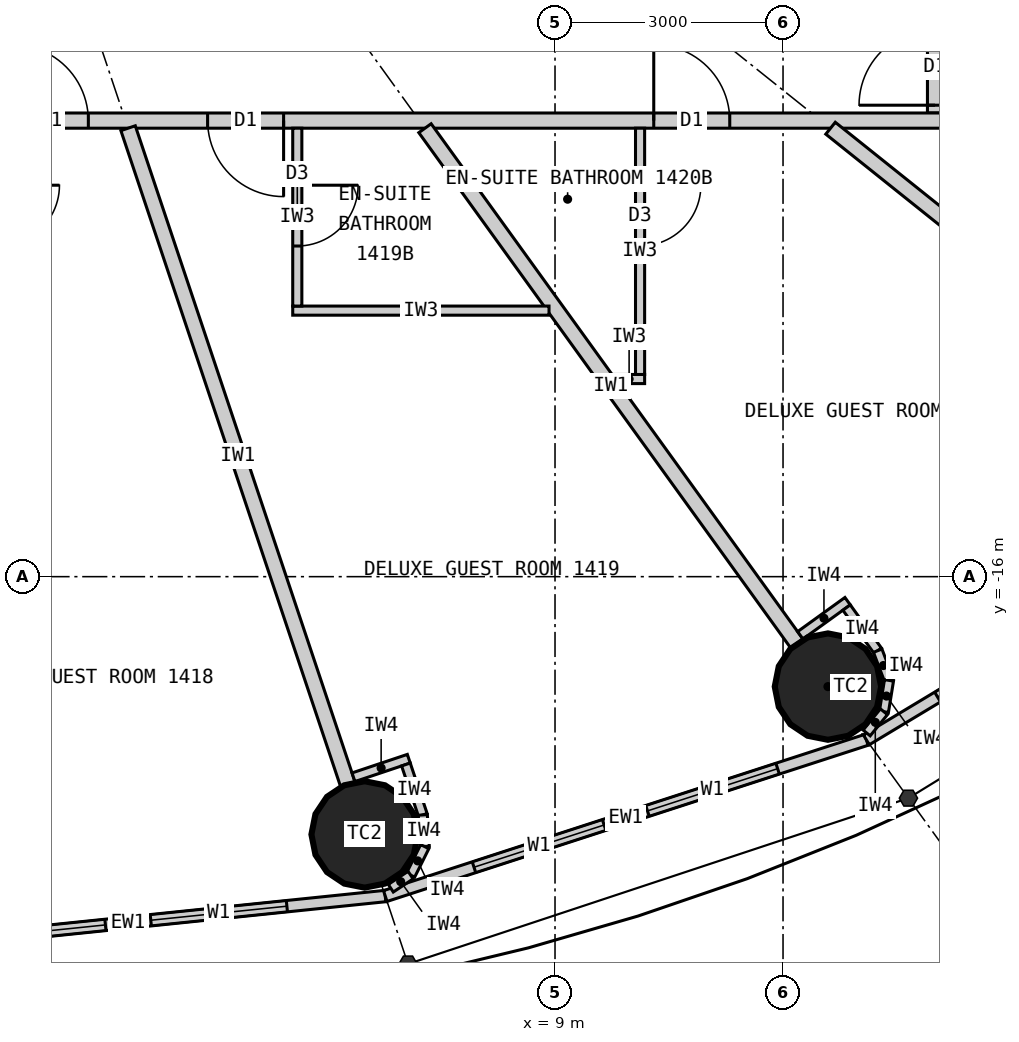
"""IFC4 building model, lengths in metres.
Left out: names, types, materials, properties, quantities, classifications, styles, units other than length and angle.
Written with IfcOpenShell. Run it as: python <this file> out.ifc"""

import sys

from ifc_helpers import new_model, si_unit, direction, frame, frame_2d, origin, origin_2d, place, context, subcontext, project, spatial, rectangle, circle, extrude, element, fill, save


model = new_model("IFC4")
c1 = context("Model", 3, precision=1e-05, world=origin(), true_north=direction((0.0, 1.0)))
c2 = subcontext(c1, "Body", "Model", "MODEL_VIEW")
j1 = project(units=[si_unit("LENGTHUNIT", "METRE"), si_unit("PLANEANGLEUNIT", "RADIAN")], contexts=[c1])
p1 = place(None, origin())
s1 = spatial("IfcSite", under=j1, at=p1, CompositionType="ELEMENT")
p2 = place(p1, origin())
s2 = spatial("IfcBuilding", under=s1, at=p2, CompositionType="ELEMENT")
p3 = place(p2, frame((0.0, 0.0, 60.6)))
s3 = spatial("IfcBuildingStorey", under=s2, at=p3, CompositionType="ELEMENT", Elevation=60.6)
for number, where, z_axis, x_axis in (
    (1, (6.495, -19.391, 0.0), (0.0, 0.0, 1.0), (1.0, 0.0, 0.0)),
    (2, (12.591, -17.447, 0.0), (0.0, 0.0, 1.0), (1.0, 0.0, 0.0)),
):
    element("IfcColumn", number, at=place(p3, frame(where, z_axis=z_axis, x_axis=x_axis)), inside=s3, PredefinedType="COLUMN", context=c2, shape_type="SweptSolid", body=[
        extrude(circle(Radius=0.7, at=origin_2d()), origin(), (0.0, 0.0, 1.0), 3.3),
    ])
p4 = place(p3, frame((0.0, -20.9, 0.0), z_axis=(0.0, 0.0, 1.0), x_axis=(0.994721394369, 0.102612609291, 0.0)))
e3 = element("IfcWall", 3, at=p4, inside=s3, PredefinedType="ELEMENTEDWALL", context=c2, shape_type="SweptSolid", body=[
    extrude(rectangle(XDim=6.802, YDim=0.15, at=frame_2d((3.401, 0.0))), origin(), (0.0, 0.0, 1.0), 3.12),
])
p5 = place(p4, frame((1.301, 0.0, 0.9)))
e4 = element("IfcOpeningElement", 4, at=p5, cuts=e3, PredefinedType="OPENING", context=c2, shape_type="SweptSolid", body=[
    extrude(rectangle(XDim=1.8, YDim=1.9, at=frame_2d((0.9, 0.95))), frame((0.0, 0.085, 0.0), z_axis=(0.0, -1.0, 0.0), x_axis=(1.0, 0.0, 0.0)), (0.0, 0.0, 1.0), 0.17),
])
p6 = place(p4, frame((3.701, 0.0, 0.9)))
e5 = element("IfcOpeningElement", 5, at=p6, cuts=e3, PredefinedType="OPENING", context=c2, shape_type="SweptSolid", body=[
    extrude(rectangle(XDim=1.8, YDim=1.9, at=frame_2d((0.9, 0.95))), frame((0.0, 0.085, 0.0), z_axis=(0.0, -1.0, 0.0), x_axis=(1.0, 0.0, 0.0)), (0.0, 0.0, 1.0), 0.17),
])
p7 = place(p3, frame((6.766, -20.202, 0.0), z_axis=(0.0, 0.0, 1.0), x_axis=(0.951137534625, 0.308767534285, 0.0)))
e6 = element("IfcWall", 6, at=p7, inside=s3, PredefinedType="ELEMENTEDWALL", context=c2, shape_type="SweptSolid", body=[
    extrude(rectangle(XDim=6.655, YDim=0.15, at=frame_2d((3.328, 0.0))), origin(), (0.0, 0.0, 1.0), 3.12),
])
p8 = place(p7, frame((1.228, 0.0, 0.9)))
e7 = element("IfcOpeningElement", 7, at=p8, cuts=e6, PredefinedType="OPENING", context=c2, shape_type="SweptSolid", body=[
    extrude(rectangle(XDim=1.8, YDim=1.9, at=frame_2d((0.9, 0.95))), frame((0.0, 0.085, 0.0), z_axis=(0.0, -1.0, 0.0), x_axis=(1.0, 0.0, 0.0)), (0.0, 0.0, 1.0), 0.17),
])
p9 = place(p7, frame((3.628, 0.0, 0.9)))
e8 = element("IfcOpeningElement", 8, at=p9, cuts=e6, PredefinedType="OPENING", context=c2, shape_type="SweptSolid", body=[
    extrude(rectangle(XDim=1.8, YDim=1.9, at=frame_2d((0.9, 0.95))), frame((0.0, 0.085, 0.0), z_axis=(0.0, -1.0, 0.0), x_axis=(1.0, 0.0, 0.0)), (0.0, 0.0, 1.0), 0.17),
])
p10 = place(p3, frame((13.096, -18.147, 0.0), z_axis=(0.0, 0.0, 1.0), x_axis=(0.856983180864, 0.515344377787, 0.0)))
e9 = element("IfcWall", 9, at=p10, inside=s3, PredefinedType="ELEMENTEDWALL", context=c2, shape_type="SweptSolid", body=[
    extrude(rectangle(XDim=6.386, YDim=0.15, at=frame_2d((3.193, 0.0))), origin(), (0.0, 0.0, 1.0), 3.12),
])
p11 = place(p10, frame((1.093, 0.0, 0.9)))
e10 = element("IfcOpeningElement", 10, at=p11, cuts=e9, PredefinedType="OPENING", context=c2, shape_type="SweptSolid", body=[
    extrude(rectangle(XDim=1.8, YDim=1.9, at=frame_2d((0.9, 0.95))), frame((0.0, 0.085, 0.0), z_axis=(0.0, -1.0, 0.0), x_axis=(1.0, 0.0, 0.0)), (0.0, 0.0, 1.0), 0.17),
])
p12 = place(p10, frame((3.493, 0.0, 0.9)))
e11 = element("IfcOpeningElement", 11, at=p12, cuts=e9, PredefinedType="OPENING", context=c2, shape_type="SweptSolid", body=[
    extrude(rectangle(XDim=1.8, YDim=1.9, at=frame_2d((0.9, 0.95))), frame((0.0, 0.085, 0.0), z_axis=(0.0, -1.0, 0.0), x_axis=(1.0, 0.0, 0.0)), (0.0, 0.0, 1.0), 0.17),
])
p13 = place(p3, frame((14.0, -9.9, 0.0), z_axis=(0.0, 0.0, 1.0), x_axis=(0.0, 1.0, 0.0)))
e12 = element("IfcWall", 12, at=p13, inside=s3, PredefinedType="PARTITIONING", context=c2, shape_type="SweptSolid", body=[
    extrude(rectangle(XDim=19.8, YDim=0.2, at=frame_2d((9.9, 0.0))), origin(), (0.0, 0.0, 1.0), 3.12),
])
p14 = place(p13, frame((0.103, 0.0, 0.0)))
e13 = element("IfcOpeningElement", 13, at=p14, cuts=e12, PredefinedType="OPENING", context=c2, shape_type="SweptSolid", body=[
    extrude(rectangle(XDim=1.0, YDim=2.2, at=frame_2d((0.5, 1.1))), frame((0.0, 0.11, 0.0), z_axis=(0.0, -1.0, 0.0), x_axis=(1.0, 0.0, 0.0)), (0.0, 0.0, 1.0), 0.22),
])
p15 = place(p13, frame((5.248, 0.0, 0.0)))
e14 = element("IfcOpeningElement", 14, at=p15, cuts=e12, PredefinedType="OPENING", context=c2, shape_type="SweptSolid", body=[
    extrude(rectangle(XDim=1.0, YDim=2.2, at=frame_2d((0.5, 1.1))), frame((0.0, 0.11, 0.0), z_axis=(0.0, -1.0, 0.0), x_axis=(1.0, 0.0, 0.0)), (0.0, 0.0, 1.0), 0.22),
])
p16 = place(p13, frame((8.438, 0.0, 0.0)))
e15 = element("IfcOpeningElement", 15, at=p16, cuts=e12, PredefinedType="OPENING", context=c2, shape_type="SweptSolid", body=[
    extrude(rectangle(XDim=1.0, YDim=2.2, at=frame_2d((0.5, 1.1))), frame((0.0, 0.11, 0.0), z_axis=(0.0, -1.0, 0.0), x_axis=(1.0, 0.0, 0.0)), (0.0, 0.0, 1.0), 0.22),
])
p17 = place(p13, frame((14.532, 0.0, 0.0)))
e16 = element("IfcOpeningElement", 16, at=p17, cuts=e12, PredefinedType="OPENING", context=c2, shape_type="SweptSolid", body=[
    extrude(rectangle(XDim=1.0, YDim=2.2, at=frame_2d((0.5, 1.1))), frame((0.0, 0.11, 0.0), z_axis=(0.0, -1.0, 0.0), x_axis=(1.0, 0.0, 0.0)), (0.0, 0.0, 1.0), 0.22),
])
p18 = place(p3, frame((14.1, -10.0, 0.0), z_axis=(0.0, 0.0, 1.0), x_axis=(-1.0, 0.0, 0.0)))
e17 = element("IfcWall", 17, at=p18, inside=s3, PredefinedType="PARTITIONING", context=c2, shape_type="SweptSolid", body=[
    extrude(rectangle(XDim=28.2, YDim=0.2, at=frame_2d((14.1, 0.0))), origin(), (0.0, 0.0, 1.0), 3.12),
])
p19 = place(p18, frame((23.865, 0.0, 0.0)))
e18 = element("IfcOpeningElement", 18, at=p19, cuts=e17, PredefinedType="OPENING", context=c2, shape_type="SweptSolid", body=[
    extrude(rectangle(XDim=1.0, YDim=2.2, at=frame_2d((0.5, 1.1))), frame((0.0, 0.11, 0.0), z_axis=(0.0, -1.0, 0.0), x_axis=(1.0, 0.0, 0.0)), (0.0, 0.0, 1.0), 0.22),
])
p20 = place(p18, frame((18.529, 0.0, 0.0)))
e19 = element("IfcOpeningElement", 19, at=p20, cuts=e17, PredefinedType="OPENING", context=c2, shape_type="SweptSolid", body=[
    extrude(rectangle(XDim=1.0, YDim=2.2, at=frame_2d((0.5, 1.1))), frame((0.0, 0.11, 0.0), z_axis=(0.0, -1.0, 0.0), x_axis=(1.0, 0.0, 0.0)), (0.0, 0.0, 1.0), 0.22),
])
p21 = place(p18, frame((14.623, 0.0, 0.0)))
e20 = element("IfcOpeningElement", 20, at=p21, cuts=e17, PredefinedType="OPENING", context=c2, shape_type="SweptSolid", body=[
    extrude(rectangle(XDim=1.0, YDim=2.2, at=frame_2d((0.5, 1.1))), frame((0.0, 0.11, 0.0), z_axis=(0.0, -1.0, 0.0), x_axis=(1.0, 0.0, 0.0)), (0.0, 0.0, 1.0), 0.22),
])
p22 = place(p18, frame((11.24, 0.0, 0.0)))
e21 = element("IfcOpeningElement", 21, at=p22, cuts=e17, PredefinedType="OPENING", context=c2, shape_type="SweptSolid", body=[
    extrude(rectangle(XDim=1.0, YDim=2.2, at=frame_2d((0.5, 1.1))), frame((0.0, 0.11, 0.0), z_axis=(0.0, -1.0, 0.0), x_axis=(1.0, 0.0, 0.0)), (0.0, 0.0, 1.0), 0.22),
])
p23 = place(p18, frame((8.671, 0.0, 0.0)))
e22 = element("IfcOpeningElement", 22, at=p23, cuts=e17, PredefinedType="OPENING", context=c2, shape_type="SweptSolid", body=[
    extrude(rectangle(XDim=1.0, YDim=2.2, at=frame_2d((0.5, 1.1))), frame((0.0, 0.11, 0.0), z_axis=(0.0, -1.0, 0.0), x_axis=(1.0, 0.0, 0.0)), (0.0, 0.0, 1.0), 0.22),
])
p24 = place(p18, frame((2.801, 0.0, 0.0)))
e23 = element("IfcOpeningElement", 23, at=p24, cuts=e17, PredefinedType="OPENING", context=c2, shape_type="SweptSolid", body=[
    extrude(rectangle(XDim=1.0, YDim=2.2, at=frame_2d((0.5, 1.1))), frame((0.0, 0.11, 0.0), z_axis=(0.0, -1.0, 0.0), x_axis=(1.0, 0.0, 0.0)), (0.0, 0.0, 1.0), 0.22),
])
p25 = place(p3, frame((3.383, -10.1, 0.0), z_axis=(0.0, 0.0, 1.0), x_axis=(0.31759592231, -0.948226149256, 0.0)))
e24 = element("IfcWall", 24, at=p25, inside=s3, PredefinedType="PARTITIONING", context=c2, shape_type="SweptSolid", body=[
    extrude(rectangle(XDim=9.098, YDim=0.2, at=frame_2d((4.549, 0.0))), origin(), (0.0, 0.0, 1.0), 2.32),
])
p26 = place(p3, frame((7.289, -10.1, 0.0), z_axis=(0.0, 0.0, 1.0), x_axis=(0.585198353053, -0.810890182197, 0.0)))
e25 = element("IfcWall", 25, at=p26, inside=s3, PredefinedType="PARTITIONING", context=c2, shape_type="SweptSolid", body=[
    extrude(rectangle(XDim=8.36, YDim=0.2, at=frame_2d((4.18, 0.0))), origin(), (0.0, 0.0, 1.0), 2.32),
])
p27 = place(p3, frame((12.625, -10.1, 0.0), z_axis=(0.0, 0.0, 1.0), x_axis=(0.780892451574, -0.624665493744, 0.0)))
e26 = element("IfcWall", 26, at=p27, inside=s3, PredefinedType="PARTITIONING", context=c2, shape_type="SweptSolid", body=[
    extrude(rectangle(XDim=6.045, YDim=0.2, at=frame_2d((3.022, 0.0))), origin(), (0.0, 0.0, 1.0), 2.32),
])
p28 = place(p3, frame((8.921, -12.5, 0.0), z_axis=(0.0, 0.0, 1.0), x_axis=(-1.0, 0.0, 0.0)))
e27 = element("IfcWall", 27, at=p28, inside=s3, PredefinedType="PARTITIONING", context=c2, shape_type="SweptSolid", body=[
    extrude(rectangle(XDim=3.372, YDim=0.12, at=frame_2d((1.686, 0.0))), origin(), (0.0, 0.0, 1.0), 3.12),
])
p29 = place(p3, frame((5.609, -10.1, 0.0), z_axis=(0.0, 0.0, 1.0), x_axis=(0.0, -1.0, 0.0)))
e28 = element("IfcWall", 28, at=p29, inside=s3, PredefinedType="PARTITIONING", context=c2, shape_type="SweptSolid", body=[
    extrude(rectangle(XDim=2.34, YDim=0.12, at=frame_2d((1.17, 0.0))), origin(), (0.0, 0.0, 1.0), 3.12),
])
p30 = place(p29, frame((0.75, 0.0, 0.0)))
e29 = element("IfcOpeningElement", 29, at=p30, cuts=e28, PredefinedType="OPENING", context=c2, shape_type="SweptSolid", body=[
    extrude(rectangle(XDim=0.8, YDim=2.1, at=frame_2d((0.4, 1.05))), frame((0.0, 0.07, 0.0), z_axis=(0.0, -1.0, 0.0), x_axis=(1.0, 0.0, 0.0)), (0.0, 0.0, 1.0), 0.14),
])
p31 = place(p3, frame((9.771, -13.4, 0.0), z_axis=(0.0, 0.0, 1.0), x_axis=(1.0, 0.0, 0.0)))
e30 = element("IfcWall", 30, at=p31, inside=s3, PredefinedType="PARTITIONING", context=c2, shape_type="SweptSolid", body=[
    extrude(rectangle(XDim=0.408, YDim=0.12, at=frame_2d((0.204, 0.0))), origin(), (0.0, 0.0, 1.0), 3.12),
])
p32 = place(p3, frame((10.119, -10.1, 0.0), z_axis=(0.0, 0.0, 1.0), x_axis=(0.0, -1.0, 0.0)))
e31 = element("IfcWall", 31, at=p32, inside=s3, PredefinedType="PARTITIONING", context=c2, shape_type="SweptSolid", body=[
    extrude(rectangle(XDim=3.24, YDim=0.12, at=frame_2d((1.62, 0.0))), origin(), (0.0, 0.0, 1.0), 3.12),
])
p33 = place(p32, frame((0.75, 0.0, 0.0)))
e32 = element("IfcOpeningElement", 32, at=p33, cuts=e31, PredefinedType="OPENING", context=c2, shape_type="SweptSolid", body=[
    extrude(rectangle(XDim=0.8, YDim=2.1, at=frame_2d((0.4, 1.05))), frame((0.0, 0.07, 0.0), z_axis=(0.0, -1.0, 0.0), x_axis=(1.0, 0.0, 0.0)), (0.0, 0.0, 1.0), 0.14),
])
p34 = place(p3, frame((6.348, -18.639, 0.0), z_axis=(0.0, 0.0, 1.0), x_axis=(0.948268951266, 0.317468102437, 0.0)))
e33 = element("IfcWall", 33, at=p34, inside=s3, PredefinedType="PARTITIONING", context=c2, shape_type="SweptSolid", body=[
    extrude(rectangle(XDim=0.768, YDim=0.12, at=frame_2d((0.384, 0.0))), origin(), (0.0, 0.0, 1.0), 3.12),
])
p35 = place(p3, frame((7.038, -18.471, 0.0), z_axis=(0.0, 0.0, 1.0), x_axis=(0.317378466199, -0.9482989556, 0.0)))
e34 = element("IfcWall", 34, at=p35, inside=s3, PredefinedType="PARTITIONING", context=c2, shape_type="SweptSolid", body=[
    extrude(rectangle(XDim=0.7, YDim=0.12, at=frame_2d((0.35, 0.0))), origin(), (0.0, 0.0, 1.0), 3.12),
])
p36 = place(p3, frame((7.26, -19.135, 0.0), z_axis=(0.0, 0.0, 1.0), x_axis=(0.0613238046, -0.99811792439, 0.0)))
e35 = element("IfcWall", 35, at=p36, inside=s3, PredefinedType="PARTITIONING", context=c2, shape_type="SweptSolid", body=[
    extrude(rectangle(XDim=0.418, YDim=0.12, at=frame_2d((0.209, 0.0))), origin(), (0.0, 0.0, 1.0), 3.12),
])
p37 = place(p3, frame((7.286, -19.552, 0.0), z_axis=(0.0, 0.0, 1.0), x_axis=(-0.445810757773, -0.89512723579, 0.0)))
e36 = element("IfcWall", 36, at=p37, inside=s3, PredefinedType="PARTITIONING", context=c2, shape_type="SweptSolid", body=[
    extrude(rectangle(XDim=0.418, YDim=0.12, at=frame_2d((0.209, 0.0))), origin(), (0.0, 0.0, 1.0), 3.12),
])
p38 = place(p3, frame((7.1, -19.926, 0.0), z_axis=(0.0, 0.0, 1.0), x_axis=(-0.833488262509, -0.552537162787, 0.0)))
e37 = element("IfcWall", 37, at=p38, inside=s3, PredefinedType="PARTITIONING", context=c2, shape_type="SweptSolid", body=[
    extrude(rectangle(XDim=0.313, YDim=0.12, at=frame_2d((0.156, 0.0))), origin(), (0.0, 0.0, 1.0), 3.12),
])
p39 = place(p3, frame((12.227, -16.772, 0.0), z_axis=(0.0, 0.0, 1.0), x_axis=(0.810821798253, 0.585293098778, 0.0)))
e38 = element("IfcWall", 38, at=p39, inside=s3, PredefinedType="PARTITIONING", context=c2, shape_type="SweptSolid", body=[
    extrude(rectangle(XDim=0.768, YDim=0.12, at=frame_2d((0.384, 0.0))), origin(), (0.0, 0.0, 1.0), 3.12),
])
p40 = place(p3, frame((12.836, -16.406, 0.0), z_axis=(0.0, 0.0, 1.0), x_axis=(0.585223113993, -0.810872312296, 0.0)))
e39 = element("IfcWall", 39, at=p40, inside=s3, PredefinedType="PARTITIONING", context=c2, shape_type="SweptSolid", body=[
    extrude(rectangle(XDim=0.7, YDim=0.12, at=frame_2d((0.35, 0.0))), origin(), (0.0, 0.0, 1.0), 3.12),
])
p41 = place(p3, frame((13.246, -16.974, 0.0), z_axis=(0.0, 0.0, 1.0), x_axis=(0.355728122235, -0.934589483705, 0.0)))
e40 = element("IfcWall", 40, at=p41, inside=s3, PredefinedType="PARTITIONING", context=c2, shape_type="SweptSolid", body=[
    extrude(rectangle(XDim=0.418, YDim=0.12, at=frame_2d((0.209, 0.0))), origin(), (0.0, 0.0, 1.0), 3.12),
])
p42 = place(p3, frame((13.394, -17.365, 0.0), z_axis=(0.0, 0.0, 1.0), x_axis=(-0.159379276926, -0.987217425943, 0.0)))
e41 = element("IfcWall", 41, at=p42, inside=s3, PredefinedType="PARTITIONING", context=c2, shape_type="SweptSolid", body=[
    extrude(rectangle(XDim=0.418, YDim=0.12, at=frame_2d((0.209, 0.0))), origin(), (0.0, 0.0, 1.0), 3.12),
])
p43 = place(p3, frame((13.328, -17.777, 0.0), z_axis=(0.0, 0.0, 1.0), x_axis=(-0.632276783541, -0.774742582407, 0.0)))
e42 = element("IfcWall", 42, at=p43, inside=s3, PredefinedType="PARTITIONING", context=c2, shape_type="SweptSolid", body=[
    extrude(rectangle(XDim=0.36, YDim=0.12, at=frame_2d((0.18, 0.0))), origin(), (0.0, 0.0, 1.0), 3.12),
])
p44 = place(p5, origin())
e43 = element("IfcWindow", 43, at=p44, inside=s3, PartitioningType="SINGLE_PANEL", PredefinedType="WINDOW", context=c2, shape_type="SweptSolid", body=[
    extrude(rectangle(XDim=1.8, YDim=1.9, at=frame_2d((0.9, 0.95))), frame((0.0, 0.03, 0.0), z_axis=(0.0, -1.0, 0.0), x_axis=(1.0, 0.0, 0.0)), (0.0, 0.0, 1.0), 0.06),
])
fill(e4, e43)
p45 = place(p6, origin())
e44 = element("IfcWindow", 44, at=p45, inside=s3, PartitioningType="SINGLE_PANEL", PredefinedType="WINDOW", context=c2, shape_type="SweptSolid", body=[
    extrude(rectangle(XDim=1.8, YDim=1.9, at=frame_2d((0.9, 0.95))), frame((0.0, 0.03, 0.0), z_axis=(0.0, -1.0, 0.0), x_axis=(1.0, 0.0, 0.0)), (0.0, 0.0, 1.0), 0.06),
])
fill(e5, e44)
p46 = place(p8, origin())
e45 = element("IfcWindow", 45, at=p46, inside=s3, PartitioningType="SINGLE_PANEL", PredefinedType="WINDOW", context=c2, shape_type="SweptSolid", body=[
    extrude(rectangle(XDim=1.8, YDim=1.9, at=frame_2d((0.9, 0.95))), frame((0.0, 0.03, 0.0), z_axis=(0.0, -1.0, 0.0), x_axis=(1.0, 0.0, 0.0)), (0.0, 0.0, 1.0), 0.06),
])
fill(e7, e45)
p47 = place(p9, origin())
e46 = element("IfcWindow", 46, at=p47, inside=s3, PartitioningType="SINGLE_PANEL", PredefinedType="WINDOW", context=c2, shape_type="SweptSolid", body=[
    extrude(rectangle(XDim=1.8, YDim=1.9, at=frame_2d((0.9, 0.95))), frame((0.0, 0.03, 0.0), z_axis=(0.0, -1.0, 0.0), x_axis=(1.0, 0.0, 0.0)), (0.0, 0.0, 1.0), 0.06),
])
fill(e8, e46)
p48 = place(p11, origin())
e47 = element("IfcWindow", 47, at=p48, inside=s3, PartitioningType="SINGLE_PANEL", PredefinedType="WINDOW", context=c2, shape_type="SweptSolid", body=[
    extrude(rectangle(XDim=1.8, YDim=1.9, at=frame_2d((0.9, 0.95))), frame((0.0, 0.03, 0.0), z_axis=(0.0, -1.0, 0.0), x_axis=(1.0, 0.0, 0.0)), (0.0, 0.0, 1.0), 0.06),
])
fill(e10, e47)
p49 = place(p14, origin())
e48 = element("IfcDoor", 48, at=p49, inside=s3, OperationType="SINGLE_SWING_LEFT", PredefinedType="DOOR", context=c2, shape_type="SweptSolid", body=[
    extrude(rectangle(XDim=1.0, YDim=2.2, at=frame_2d((0.5, 1.1))), frame((0.0, 0.025, 0.0), z_axis=(0.0, -1.0, 0.0), x_axis=(1.0, 0.0, 0.0)), (0.0, 0.0, 1.0), 0.05),
])
fill(e13, e48)
p50 = place(p22, origin())
e49 = element("IfcDoor", 49, at=p50, inside=s3, OperationType="SINGLE_SWING_RIGHT", PredefinedType="DOOR", context=c2, shape_type="SweptSolid", body=[
    extrude(rectangle(XDim=1.0, YDim=2.2, at=frame_2d((0.5, 1.1))), frame((0.0, 0.025, 0.0), z_axis=(0.0, -1.0, 0.0), x_axis=(1.0, 0.0, 0.0)), (0.0, 0.0, 1.0), 0.05),
])
fill(e21, e49)
p51 = place(p30, origin())
e50 = element("IfcDoor", 50, at=p51, inside=s3, OperationType="SINGLE_SWING_LEFT", PredefinedType="DOOR", context=c2, shape_type="SweptSolid", body=[
    extrude(rectangle(XDim=0.8, YDim=2.1, at=frame_2d((0.4, 1.05))), frame((0.0, 0.025, 0.0), z_axis=(0.0, -1.0, 0.0), x_axis=(1.0, 0.0, 0.0)), (0.0, 0.0, 1.0), 0.05),
])
fill(e29, e50)
p52 = place(p23, origin())
e51 = element("IfcDoor", 51, at=p52, inside=s3, OperationType="SINGLE_SWING_LEFT", PredefinedType="DOOR", context=c2, shape_type="SweptSolid", body=[
    extrude(rectangle(XDim=1.0, YDim=2.2, at=frame_2d((0.5, 1.1))), frame((0.0, 0.025, 0.0), z_axis=(0.0, -1.0, 0.0), x_axis=(1.0, 0.0, 0.0)), (0.0, 0.0, 1.0), 0.05),
])
fill(e22, e51)
p53 = place(p33, origin())
e52 = element("IfcDoor", 52, at=p53, inside=s3, OperationType="SINGLE_SWING_LEFT", PredefinedType="DOOR", context=c2, shape_type="SweptSolid", body=[
    extrude(rectangle(XDim=0.8, YDim=2.1, at=frame_2d((0.4, 1.05))), frame((0.0, 0.025, 0.0), z_axis=(0.0, -1.0, 0.0), x_axis=(1.0, 0.0, 0.0)), (0.0, 0.0, 1.0), 0.05),
])
fill(e32, e52)
p54 = place(p24, origin())
e53 = element("IfcDoor", 53, at=p54, inside=s3, OperationType="SINGLE_SWING_RIGHT", PredefinedType="DOOR", context=c2, shape_type="SweptSolid", body=[
    extrude(rectangle(XDim=1.0, YDim=2.2, at=frame_2d((0.5, 1.1))), frame((0.0, 0.025, 0.0), z_axis=(0.0, -1.0, 0.0), x_axis=(1.0, 0.0, 0.0)), (0.0, 0.0, 1.0), 0.05),
])
fill(e23, e53)
save(model, sys.argv[1])
